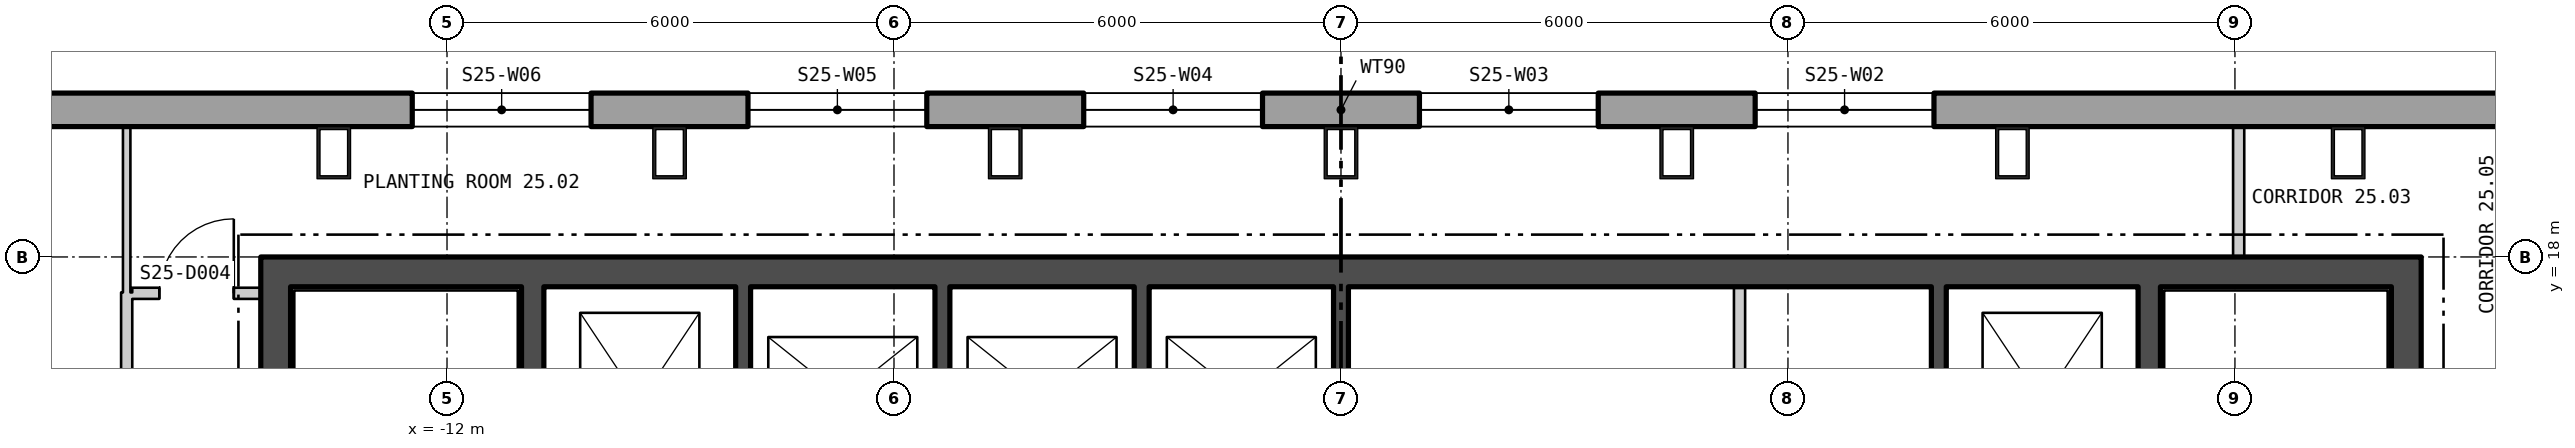
"""IFC4 building model, lengths in metres.
Left out: names, types, materials, properties, quantities, classifications, styles, units other than length and angle.
Written with IfcOpenShell. Run it as: python <this file> out.ifc"""

import sys

from ifc_helpers import new_model, si_unit, direction, frame, frame_2d, origin, origin_2d, place, context, subcontext, project, spatial, polyline, rectangle, hollow_rectangle, outline, extrude, element, fill, save


model = new_model("IFC4")
c1 = context("Model", 3, precision=1e-05, world=origin(), true_north=direction((0.0, 1.0)))
c2 = subcontext(c1, "Body", "Model", "MODEL_VIEW")
j1 = project(units=[si_unit("LENGTHUNIT", "METRE"), si_unit("PLANEANGLEUNIT", "RADIAN")], contexts=[c1])
p1 = place(None, origin())
s1 = spatial("IfcSite", under=j1, at=p1, CompositionType="ELEMENT")
p2 = place(p1, origin())
s2 = spatial("IfcBuilding", under=s1, at=p2, CompositionType="ELEMENT")
p3 = place(p2, frame((0.0, 0.0, 321.0)))
s3 = spatial("IfcBuildingStorey", under=s2, at=p3, CompositionType="ELEMENT", Elevation=321.0)
for number, where, z_axis, x_axis in (
    (1, (13.52, 19.4, 0.0), (0.0, 0.0, 1.0), (-1.0, 0.0, 0.0)),
    (2, (9.013, 19.4, 0.0), (0.0, 0.0, 1.0), (-1.0, 0.0, 0.0)),
    (3, (4.507, 19.4, 0.0), (0.0, 0.0, 1.0), (-1.0, 0.0, 0.0)),
    (4, (0.0, 19.4, 0.0), (0.0, 0.0, 1.0), (-1.0, 0.0, 0.0)),
    (5, (-4.507, 19.4, 0.0), (0.0, 0.0, 1.0), (-1.0, 0.0, 0.0)),
    (6, (-9.013, 19.4, 0.0), (0.0, 0.0, 1.0), (-1.0, 0.0, 0.0)),
    (7, (-13.52, 19.4, 0.0), (0.0, 0.0, 1.0), (-1.0, 0.0, 0.0)),
):
    element("IfcColumn", number, at=place(p3, frame(where, z_axis=z_axis, x_axis=x_axis)), inside=s3, PredefinedType="COLUMN", context=c2, shape_type="SweptSolid", body=[
        extrude(hollow_rectangle(XDim=0.45, YDim=0.7, WallThickness=0.04, at=origin_2d()), origin(), (0.0, 0.0, 1.0), 4.2),
    ])
p4 = place(p3, frame((22.865, 19.975, -0.4), z_axis=(0.0, 0.0, 1.0), x_axis=(-1.0, 0.0, 0.0)))
e8 = element("IfcWall", 8, at=p4, inside=s3, PredefinedType="SOLIDWALL", context=c2, shape_type="SweptSolid", body=[
    extrude(outline(polyline([(-0.13, -0.225), (45.86, -0.225), (45.6, 0.225), (0.13, 0.225), (-0.13, -0.225)])), origin(), (0.0, 0.0, 1.0), 4.2),
])
p5 = place(p4, frame((1.424, 0.0, 1.3)))
e9 = element("IfcOpeningElement", 9, at=p5, cuts=e8, PredefinedType="OPENING", context=c2, shape_type="SweptSolid", body=[
    extrude(rectangle(XDim=2.4, YDim=2.3, at=frame_2d((1.2, 1.15))), frame((0.0, 0.235, 0.0), z_axis=(0.0, -1.0, 0.0), x_axis=(1.0, 0.0, 0.0)), (0.0, 0.0, 1.0), 0.47),
])
p6 = place(p4, frame((14.905, 0.0, 1.3)))
e10 = element("IfcOpeningElement", 10, at=p6, cuts=e8, PredefinedType="OPENING", context=c2, shape_type="SweptSolid", body=[
    extrude(rectangle(XDim=2.4, YDim=2.3, at=frame_2d((1.2, 1.15))), frame((0.0, 0.235, 0.0), z_axis=(0.0, -1.0, 0.0), x_axis=(1.0, 0.0, 0.0)), (0.0, 0.0, 1.0), 0.47),
])
p7 = place(p4, frame((19.412, 0.0, 1.3)))
e11 = element("IfcOpeningElement", 11, at=p7, cuts=e8, PredefinedType="OPENING", context=c2, shape_type="SweptSolid", body=[
    extrude(rectangle(XDim=2.4, YDim=2.3, at=frame_2d((1.2, 1.15))), frame((0.0, 0.235, 0.0), z_axis=(0.0, -1.0, 0.0), x_axis=(1.0, 0.0, 0.0)), (0.0, 0.0, 1.0), 0.47),
])
p8 = place(p4, frame((23.918, 0.0, 1.3)))
e12 = element("IfcOpeningElement", 12, at=p8, cuts=e8, PredefinedType="OPENING", context=c2, shape_type="SweptSolid", body=[
    extrude(rectangle(XDim=2.4, YDim=2.3, at=frame_2d((1.2, 1.15))), frame((0.0, 0.235, 0.0), z_axis=(0.0, -1.0, 0.0), x_axis=(1.0, 0.0, 0.0)), (0.0, 0.0, 1.0), 0.47),
])
p9 = place(p4, frame((28.425, 0.0, 1.3)))
e13 = element("IfcOpeningElement", 13, at=p9, cuts=e8, PredefinedType="OPENING", context=c2, shape_type="SweptSolid", body=[
    extrude(rectangle(XDim=2.4, YDim=2.3, at=frame_2d((1.2, 1.15))), frame((0.0, 0.235, 0.0), z_axis=(0.0, -1.0, 0.0), x_axis=(1.0, 0.0, 0.0)), (0.0, 0.0, 1.0), 0.47),
])
p10 = place(p4, frame((32.932, 0.0, 1.3)))
e14 = element("IfcOpeningElement", 14, at=p10, cuts=e8, PredefinedType="OPENING", context=c2, shape_type="SweptSolid", body=[
    extrude(rectangle(XDim=2.4, YDim=2.3, at=frame_2d((1.2, 1.15))), frame((0.0, 0.235, 0.0), z_axis=(0.0, -1.0, 0.0), x_axis=(1.0, 0.0, 0.0)), (0.0, 0.0, 1.0), 0.47),
])
p11 = place(p4, frame((41.907, 0.0, 1.3)))
e15 = element("IfcOpeningElement", 15, at=p11, cuts=e8, PredefinedType="OPENING", context=c2, shape_type="SweptSolid", body=[
    extrude(rectangle(XDim=2.4, YDim=2.3, at=frame_2d((1.2, 1.15))), frame((0.0, 0.235, 0.0), z_axis=(0.0, -1.0, 0.0), x_axis=(1.0, 0.0, 0.0)), (0.0, 0.0, 1.0), 0.47),
])
p12 = place(p3, frame((-14.5, 17.8, 0.0), z_axis=(0.0, 0.0, 1.0), x_axis=(1.0, 0.0, 0.0)))
e16 = element("IfcWall", 16, at=p12, inside=s3, PredefinedType="SHEAR", context=c2, shape_type="SweptSolid", body=[
    extrude(rectangle(XDim=29.0, YDim=0.4, at=frame_2d((14.5, 0.0))), origin(), (0.0, 0.0, 1.0), 4.0),
])
p13 = place(p3, frame((-14.3, 4.4, 0.0), z_axis=(0.0, 0.0, 1.0), x_axis=(0.0, 1.0, 0.0)))
e17 = element("IfcWall", 17, at=p13, inside=s3, PredefinedType="SHEAR", context=c2, shape_type="SweptSolid", body=[
    extrude(rectangle(XDim=13.2, YDim=0.4, at=frame_2d((6.6, 0.0))), origin(), (0.0, 0.0, 1.0), 4.0),
])
p14 = place(p13, frame((3.05, 0.0, 0.0)))
e18 = element("IfcOpeningElement", 18, at=p14, cuts=e17, PredefinedType="OPENING", context=c2, shape_type="SweptSolid", body=[
    extrude(rectangle(XDim=1.5, YDim=2.1, at=frame_2d((0.75, 1.05))), frame((0.0, 0.21, 0.0), z_axis=(0.0, -1.0, 0.0), x_axis=(1.0, 0.0, 0.0)), (0.0, 0.0, 1.0), 0.42),
])
p15 = place(p3, frame((14.3, 4.4, 0.0), z_axis=(0.0, 0.0, 1.0), x_axis=(0.0, 1.0, 0.0)))
e19 = element("IfcWall", 19, at=p15, inside=s3, PredefinedType="SHEAR", context=c2, shape_type="SweptSolid", body=[
    extrude(rectangle(XDim=13.2, YDim=0.4, at=frame_2d((6.6, 0.0))), origin(), (0.0, 0.0, 1.0), 4.0),
])
p16 = place(p15, frame((3.05, 0.0, 0.0)))
e20 = element("IfcOpeningElement", 20, at=p16, cuts=e19, PredefinedType="OPENING", context=c2, shape_type="SweptSolid", body=[
    extrude(rectangle(XDim=1.5, YDim=2.1, at=frame_2d((0.75, 1.05))), frame((0.0, 0.21, 0.0), z_axis=(0.0, -1.0, 0.0), x_axis=(1.0, 0.0, 0.0)), (0.0, 0.0, 1.0), 0.42),
])
p17 = place(p3, frame((-10.85, 4.4, 0.0), z_axis=(0.0, 0.0, 1.0), x_axis=(0.0, 1.0, 0.0)))
e21 = element("IfcWall", 21, at=p17, inside=s3, PredefinedType="SHEAR", context=c2, shape_type="SweptSolid", body=[
    extrude(rectangle(XDim=13.2, YDim=0.3, at=frame_2d((6.6, 0.0))), origin(), (0.0, 0.0, 1.0), 4.0),
])
p18 = place(p17, frame((1.575, 0.0, 0.0)))
e22 = element("IfcOpeningElement", 22, at=p18, cuts=e21, PredefinedType="OPENING", context=c2, shape_type="SweptSolid", body=[
    extrude(rectangle(XDim=1.25, YDim=2.1, at=frame_2d((0.625, 1.05))), frame((0.0, 0.16, 0.0), z_axis=(0.0, -1.0, 0.0), x_axis=(1.0, 0.0, 0.0)), (0.0, 0.0, 1.0), 0.32),
])
p19 = place(p17, frame((0.4, 0.0, 0.0)))
e23 = element("IfcOpeningElement", 23, at=p19, cuts=e21, PredefinedType="OPENING", context=c2, shape_type="SweptSolid", body=[
    extrude(rectangle(XDim=0.9, YDim=2.1, at=frame_2d((0.45, 1.05))), frame((0.0, 0.16, 0.0), z_axis=(0.0, -1.0, 0.0), x_axis=(1.0, 0.0, 0.0)), (0.0, 0.0, 1.0), 0.32),
])
p20 = place(p3, frame((10.85, 4.4, 0.0), z_axis=(0.0, 0.0, 1.0), x_axis=(0.0, 1.0, 0.0)))
e24 = element("IfcWall", 24, at=p20, inside=s3, PredefinedType="SHEAR", context=c2, shape_type="SweptSolid", body=[
    extrude(rectangle(XDim=13.2, YDim=0.3, at=frame_2d((6.6, 0.0))), origin(), (0.0, 0.0, 1.0), 4.0),
])
p21 = place(p20, frame((1.575, 0.0, 0.0)))
e25 = element("IfcOpeningElement", 25, at=p21, cuts=e24, PredefinedType="OPENING", context=c2, shape_type="SweptSolid", body=[
    extrude(rectangle(XDim=1.25, YDim=2.1, at=frame_2d((0.625, 1.05))), frame((0.0, 0.16, 0.0), z_axis=(0.0, -1.0, 0.0), x_axis=(1.0, 0.0, 0.0)), (0.0, 0.0, 1.0), 0.32),
])
p22 = place(p20, frame((0.4, 0.0, 0.0)))
e26 = element("IfcOpeningElement", 26, at=p22, cuts=e24, PredefinedType="OPENING", context=c2, shape_type="SweptSolid", body=[
    extrude(rectangle(XDim=0.9, YDim=2.1, at=frame_2d((0.45, 1.05))), frame((0.0, 0.16, 0.0), z_axis=(0.0, -1.0, 0.0), x_axis=(1.0, 0.0, 0.0)), (0.0, 0.0, 1.0), 0.32),
])
for number, where, z_axis, x_axis in (
    (27, (-8.025, 14.7, 0.0), (0.0, 0.0, 1.0), (0.0, 1.0, 0.0)),
    (28, (-5.35, 14.7, 0.0), (0.0, 0.0, 1.0), (0.0, 1.0, 0.0)),
    (29, (-2.675, 14.7, 0.0), (0.0, 0.0, 1.0), (0.0, 1.0, 0.0)),
    (30, (0.0, 14.7, 0.0), (0.0, 0.0, 1.0), (0.0, 1.0, 0.0)),
):
    element("IfcWall", number, at=place(p3, frame(where, z_axis=z_axis, x_axis=x_axis)), inside=s3, PredefinedType="SHEAR", context=c2, shape_type="SweptSolid", body=[
        extrude(rectangle(XDim=2.9, YDim=0.2, at=frame_2d((1.45, 0.0))), origin(), (0.0, 0.0, 1.0), 4.0),
    ])
p23 = place(p3, frame((5.35, 14.7, 0.0), z_axis=(0.0, 0.0, 1.0), x_axis=(0.0, 1.0, 0.0)))
e31 = element("IfcWall", 31, at=p23, inside=s3, PredefinedType="PARTITIONING", context=c2, shape_type="SweptSolid", body=[
    extrude(rectangle(XDim=2.9, YDim=0.15, at=frame_2d((1.45, 0.0))), origin(), (0.0, 0.0, 1.0), 4.0),
])
p24 = place(p3, frame((8.025, 14.7, 0.0), z_axis=(0.0, 0.0, 1.0), x_axis=(0.0, 1.0, 0.0)))
e32 = element("IfcWall", 32, at=p24, inside=s3, PredefinedType="SHEAR", context=c2, shape_type="SweptSolid", body=[
    extrude(rectangle(XDim=2.9, YDim=0.2, at=frame_2d((1.45, 0.0))), origin(), (0.0, 0.0, 1.0), 4.0),
])
p25 = place(p3, frame((-16.3, 2.125, 0.0), z_axis=(0.0, 0.0, 1.0), x_axis=(0.0, 1.0, 0.0)))
e33 = element("IfcWall", 33, at=p25, inside=s3, PredefinedType="PARTITIONING", context=c2, shape_type="SweptSolid", body=[
    extrude(rectangle(XDim=15.399, YDim=0.15, at=frame_2d((7.699, 0.0))), origin(), (0.0, 0.0, 1.0), 4.0),
])
p26 = place(p25, frame((6.88, 0.0, 0.0)))
e34 = element("IfcOpeningElement", 34, at=p26, cuts=e33, PredefinedType="OPENING", context=c2, shape_type="SweptSolid", body=[
    extrude(rectangle(XDim=1.0, YDim=2.1, at=frame_2d((0.5, 1.05))), frame((0.0, 0.085, 0.0), z_axis=(0.0, -1.0, 0.0), x_axis=(1.0, 0.0, 0.0)), (0.0, 0.0, 1.0), 0.17),
])
p27 = place(p25, frame((13.069, 0.0, 0.0)))
e35 = element("IfcOpeningElement", 35, at=p27, cuts=e33, PredefinedType="OPENING", context=c2, shape_type="SweptSolid", body=[
    extrude(rectangle(XDim=1.0, YDim=2.1, at=frame_2d((0.5, 1.05))), frame((0.0, 0.085, 0.0), z_axis=(0.0, -1.0, 0.0), x_axis=(1.0, 0.0, 0.0)), (0.0, 0.0, 1.0), 0.17),
])
p28 = place(p3, frame((-16.3, 17.524, 0.0), z_axis=(0.0, 0.0, 1.0), x_axis=(0.0, 1.0, 0.0)))
e36 = element("IfcWall", 36, at=p28, inside=s3, PredefinedType="PARTITIONING", context=c2, shape_type="SweptSolid", body=[
    extrude(rectangle(XDim=2.224, YDim=0.1, at=frame_2d((1.112, 0.0))), origin(), (0.0, 0.0, 1.0), 4.0),
])
p29 = place(p3, frame((-16.225, 17.512, 0.0), z_axis=(0.0, 0.0, 1.0), x_axis=(1.0, 0.0, 0.0)))
e37 = element("IfcWall", 37, at=p29, inside=s3, PredefinedType="PARTITIONING", context=c2, shape_type="SweptSolid", body=[
    extrude(rectangle(XDim=1.725, YDim=0.15, at=frame_2d((0.863, 0.0))), origin(), (0.0, 0.0, 1.0), 4.0),
])
p30 = place(p29, frame((0.363, 0.0, 0.0)))
e38 = element("IfcOpeningElement", 38, at=p30, cuts=e37, PredefinedType="OPENING", context=c2, shape_type="SweptSolid", body=[
    extrude(rectangle(XDim=1.0, YDim=2.1, at=frame_2d((0.5, 1.05))), frame((0.0, 0.085, 0.0), z_axis=(0.0, -1.0, 0.0), x_axis=(1.0, 0.0, 0.0)), (0.0, 0.0, 1.0), 0.17),
])
p31 = place(p3, frame((12.05, 18.0, 0.0), z_axis=(0.0, 0.0, 1.0), x_axis=(0.0, 1.0, 0.0)))
e39 = element("IfcWall", 39, at=p31, inside=s3, PredefinedType="PARTITIONING", context=c2, shape_type="SweptSolid", body=[
    extrude(rectangle(XDim=1.75, YDim=0.15, at=frame_2d((0.875, 0.0))), origin(), (0.0, 0.0, 1.0), 4.0),
])
p32 = place(p6, origin())
e40 = element("IfcWindow", 40, at=p32, inside=s3, PartitioningType="SINGLE_PANEL", PredefinedType="WINDOW", context=c2, shape_type="SweptSolid", body=[
    extrude(rectangle(XDim=2.4, YDim=2.3, at=frame_2d((1.2, 1.15))), frame((0.0, 0.105, 0.0), z_axis=(0.0, -1.0, 0.0), x_axis=(1.0, 0.0, 0.0)), (0.0, 0.0, 1.0), 0.06),
])
fill(e10, e40)
p33 = place(p7, origin())
e41 = element("IfcWindow", 41, at=p33, inside=s3, PartitioningType="SINGLE_PANEL", PredefinedType="WINDOW", context=c2, shape_type="SweptSolid", body=[
    extrude(rectangle(XDim=2.4, YDim=2.3, at=frame_2d((1.2, 1.15))), frame((0.0, 0.105, 0.0), z_axis=(0.0, -1.0, 0.0), x_axis=(1.0, 0.0, 0.0)), (0.0, 0.0, 1.0), 0.06),
])
fill(e11, e41)
p34 = place(p8, origin())
e42 = element("IfcWindow", 42, at=p34, inside=s3, PartitioningType="SINGLE_PANEL", PredefinedType="WINDOW", context=c2, shape_type="SweptSolid", body=[
    extrude(rectangle(XDim=2.4, YDim=2.3, at=frame_2d((1.2, 1.15))), frame((0.0, 0.105, 0.0), z_axis=(0.0, -1.0, 0.0), x_axis=(1.0, 0.0, 0.0)), (0.0, 0.0, 1.0), 0.06),
])
fill(e12, e42)
p35 = place(p9, origin())
e43 = element("IfcWindow", 43, at=p35, inside=s3, PartitioningType="SINGLE_PANEL", PredefinedType="WINDOW", context=c2, shape_type="SweptSolid", body=[
    extrude(rectangle(XDim=2.4, YDim=2.3, at=frame_2d((1.2, 1.15))), frame((0.0, 0.105, 0.0), z_axis=(0.0, -1.0, 0.0), x_axis=(1.0, 0.0, 0.0)), (0.0, 0.0, 1.0), 0.06),
])
fill(e13, e43)
p36 = place(p10, origin())
e44 = element("IfcWindow", 44, at=p36, inside=s3, PartitioningType="SINGLE_PANEL", PredefinedType="WINDOW", context=c2, shape_type="SweptSolid", body=[
    extrude(rectangle(XDim=2.4, YDim=2.3, at=frame_2d((1.2, 1.15))), frame((0.0, 0.105, 0.0), z_axis=(0.0, -1.0, 0.0), x_axis=(1.0, 0.0, 0.0)), (0.0, 0.0, 1.0), 0.06),
])
fill(e14, e44)
p37 = place(p30, origin())
e45 = element("IfcDoor", 45, at=p37, inside=s3, OperationType="SINGLE_SWING_LEFT", PredefinedType="DOOR", context=c2, shape_type="SweptSolid", body=[
    extrude(rectangle(XDim=1.0, YDim=2.1, at=frame_2d((0.5, 1.05))), frame((0.0, 0.025, 0.0), z_axis=(0.0, -1.0, 0.0), x_axis=(1.0, 0.0, 0.0)), (0.0, 0.0, 1.0), 0.05),
])
fill(e38, e45)
save(model, sys.argv[1])
